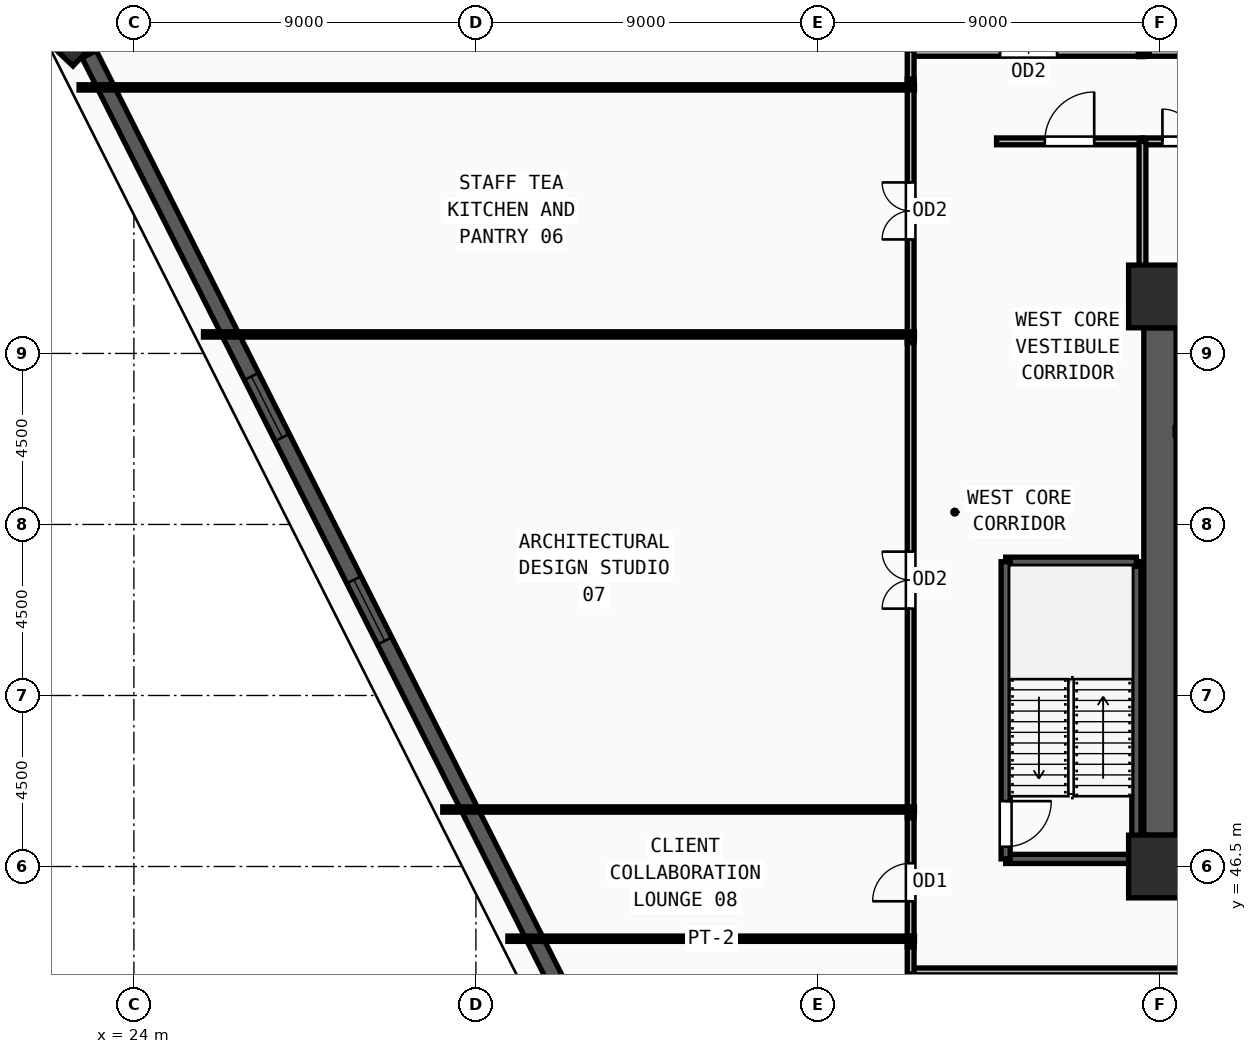
"""IFC4 building model, lengths in metres.
Left out: names, types, materials, properties, quantities, classifications, styles, units other than length and angle.
Written with IfcOpenShell. Run it as: python <this file> out.ifc"""

import sys

from ifc_helpers import new_model, si_unit, direction, frame, frame_2d, origin, origin_2d, place, context, subcontext, project, spatial, rectangle, extrude, source, transform, mapped, element, fill, save


model = new_model("IFC4")
c1 = context("Model", 3, precision=1e-05, world=origin(), true_north=direction((0.0, 1.0)))
c2 = subcontext(c1, "Body", "Model", "MODEL_VIEW")
j1 = project(units=[si_unit("LENGTHUNIT", "METRE"), si_unit("PLANEANGLEUNIT", "RADIAN")], contexts=[c1])
p1 = place(None, origin())
s1 = spatial("IfcSite", under=j1, at=p1, CompositionType="ELEMENT")
p2 = place(p1, origin())
s2 = spatial("IfcBuilding", under=s1, at=p2, CompositionType="ELEMENT")
p3 = place(p2, frame((0.0, 0.0, 85.5)))
s3 = spatial("IfcBuildingStorey", under=s2, at=p3, CompositionType="ELEMENT", Elevation=85.5)
m1 = source(origin(), c2, "Body", "SweptSolid", [
    extrude(rectangle(XDim=1.65, YDim=1.65, at=origin_2d()), origin(), (0.0, 0.0, 1.0), 3.75),
])
for number, where, z_axis, x_axis in (
    (1, (51.0, 46.5, 0.0), (0.0, 0.0, 1.0), (1.0, 0.0, 0.0)),
    (2, (51.0, 61.5, 0.0), (0.0, 0.0, 1.0), (1.0, 0.0, 0.0)),
):
    element("IfcColumn", number, at=place(p3, frame(where, z_axis=z_axis, x_axis=x_axis)), inside=s3, PredefinedType="COLUMN", context=c2, shape_type="MappedRepresentation", body=[
        mapped(m1, transform((0.0, 0.0, 0.0), x_axis=(1.0, 0.0, 0.0), y_axis=(0.0, 1.0, 0.0), z_axis=(0.0, 0.0, 1.0), scale=1.0)),
    ])
m2 = source(origin(), c2, "Body", "SweptSolid", [
    extrude(rectangle(XDim=1.55, YDim=1.25, at=origin_2d()), origin(), (0.0, 0.0, 1.0), 3.75),
])
p4 = place(p3, frame((22.479, 68.555, 0.0), z_axis=(0.0, 0.0, 1.0), x_axis=(0.68936671806, 0.724412539946, 0.0)))
e3 = element("IfcColumn", 3, at=p4, inside=s3, PredefinedType="COLUMN", context=c2, shape_type="MappedRepresentation", body=[
    mapped(m2, transform((0.0, 0.0, 0.0), x_axis=(1.0, 0.0, 0.0), y_axis=(0.0, 1.0, 0.0), z_axis=(0.0, 0.0, 1.0), scale=1.0)),
])
p5 = place(p3, frame((22.823, 67.872, 0.0), z_axis=(0.0, 0.0, 1.0), x_axis=(0.449893825909, -0.893082048531, 0.0)))
e4 = element("IfcWall", 4, at=p5, inside=s3, PredefinedType="SOLIDWALL", context=c2, shape_type="SweptSolid", body=[
    extrude(rectangle(XDim=32.768, YDim=0.42, at=frame_2d((16.384, 0.0))), origin(), (0.0, 0.0, 1.0), 3.57),
])
m3 = source(origin(), c2, "Body", "SweptSolid", [
    extrude(rectangle(XDim=1.8, YDim=1.95, at=frame_2d((0.9, 0.975))), frame((0.0, 0.22, 0.0), z_axis=(0.0, -1.0, 0.0), x_axis=(1.0, 0.0, 0.0)), (0.0, 0.0, 1.0), 0.44),
])
p6 = place(p5, frame((9.492, 0.0, 0.55)))
e5 = element("IfcOpeningElement", 5, at=p6, cuts=e4, PredefinedType="OPENING", context=c2, shape_type="MappedRepresentation", body=[
    mapped(m3, transform((0.0, 0.0, 0.0), x_axis=(1.0, 0.0, 0.0), y_axis=(0.0, 1.0, 0.0), z_axis=(0.0, 0.0, 1.0), scale=1.0)),
])
p7 = place(p5, frame((15.484, 0.0, 0.55)))
e6 = element("IfcOpeningElement", 6, at=p7, cuts=e4, PredefinedType="OPENING", context=c2, shape_type="MappedRepresentation", body=[
    mapped(m3, transform((0.0, 0.0, 0.0), x_axis=(1.0, 0.0, 0.0), y_axis=(0.0, 1.0, 0.0), z_axis=(0.0, 0.0, 1.0), scale=1.0)),
])
p8 = place(p3, frame((51.0, 47.325, 0.0), z_axis=(0.0, 0.0, 1.0), x_axis=(0.0, 1.0, 0.0)))
e7 = element("IfcWall", 7, at=p8, inside=s3, PredefinedType="SHEAR", context=c2, shape_type="SweptSolid", body=[
    extrude(rectangle(XDim=13.35, YDim=0.85, at=frame_2d((6.675, 0.0))), origin(), (0.0, 0.0, 1.0), 3.57),
])
p9 = place(p3, frame((46.94, 46.7, 0.0), z_axis=(0.0, 0.0, 1.0), x_axis=(1.0, 0.0, 0.0)))
e8 = element("IfcWall", 8, at=p9, inside=s3, PredefinedType="SOLIDWALL", context=c2, shape_type="SweptSolid", body=[
    extrude(rectangle(XDim=3.44, YDim=0.24, at=frame_2d((1.72, 0.0))), origin(), (0.0, 0.0, 1.0), 3.57),
])
p10 = place(p3, frame((50.38, 46.7, 0.0), z_axis=(0.0, 0.0, 1.0), x_axis=(0.0, 1.0, 0.0)))
e9 = element("IfcWall", 9, at=p10, inside=s3, PredefinedType="SOLIDWALL", context=c2, shape_type="SweptSolid", body=[
    extrude(rectangle(XDim=7.82, YDim=0.24, at=frame_2d((3.91, 0.0))), origin(), (0.0, 0.0, 1.0), 3.57),
])
p11 = place(p3, frame((50.38, 54.52, 0.0), z_axis=(0.0, 0.0, 1.0), x_axis=(-1.0, 0.0, 0.0)))
e10 = element("IfcWall", 10, at=p11, inside=s3, PredefinedType="SOLIDWALL", context=c2, shape_type="SweptSolid", body=[
    extrude(rectangle(XDim=3.44, YDim=0.24, at=frame_2d((1.72, 0.0))), origin(), (0.0, 0.0, 1.0), 3.57),
])
p12 = place(p3, frame((46.94, 54.52, 0.0), z_axis=(0.0, 0.0, 1.0), x_axis=(0.0, -1.0, 0.0)))
e11 = element("IfcWall", 11, at=p12, inside=s3, PredefinedType="SOLIDWALL", context=c2, shape_type="SweptSolid", body=[
    extrude(rectangle(XDim=7.82, YDim=0.24, at=frame_2d((3.91, 0.0))), origin(), (0.0, 0.0, 1.0), 3.57),
])
m4 = source(origin(), c2, "Body", "SweptSolid", [
    extrude(rectangle(XDim=1.2, YDim=2.2, at=frame_2d((0.6, 1.1))), frame((0.0, 0.13, 0.0), z_axis=(0.0, -1.0, 0.0), x_axis=(1.0, 0.0, 0.0)), (0.0, 0.0, 1.0), 0.26),
])
p13 = place(p12, frame((6.3, 0.0, 0.0)))
e12 = element("IfcOpeningElement", 12, at=p13, cuts=e11, PredefinedType="OPENING", context=c2, shape_type="MappedRepresentation", body=[
    mapped(m4, transform((0.0, 0.0, 0.0), x_axis=(1.0, 0.0, 0.0), y_axis=(0.0, 1.0, 0.0), z_axis=(0.0, 0.0, 1.0), scale=1.0)),
])
for number, where, z_axis, x_axis in (
    (13, (51.4, 57.95, 0.0), (0.0, 0.0, 1.0), (1.0, 0.0, 0.0)),
    (14, (53.8, 60.88, 0.0), (0.0, 0.0, 1.0), (-1.0, 0.0, 0.0)),
):
    element("IfcWall", number, at=place(p3, frame(where, z_axis=z_axis, x_axis=x_axis)), inside=s3, PredefinedType="SOLIDWALL", context=c2, shape_type="SweptSolid", body=[
        extrude(rectangle(XDim=2.4, YDim=0.2, at=frame_2d((1.2, 0.0))), origin(), (0.0, 0.0, 1.0), 3.57),
    ])
p14 = place(p3, frame((50.54, 65.58, 0.0), z_axis=(0.0, 0.0, 1.0), x_axis=(1.0, 0.0, 0.0)))
e15 = element("IfcWall", 15, at=p14, inside=s3, PredefinedType="PARTITIONING", context=c2, shape_type="SweptSolid", body=[
    extrude(rectangle(XDim=1.9, YDim=0.18, at=frame_2d((0.95, 0.0))), origin(), (0.0, 0.0, 1.0), 3.57),
])
m5 = source(origin(), c2, "Body", "SweptSolid", [
    extrude(rectangle(XDim=0.85, YDim=2.1, at=frame_2d((0.425, 1.05))), frame((0.0, 0.1, 0.0), z_axis=(0.0, -1.0, 0.0), x_axis=(1.0, 0.0, 0.0)), (0.0, 0.0, 1.0), 0.2),
])
p15 = place(p14, frame((0.525, 0.0, 0.0)))
e16 = element("IfcOpeningElement", 16, at=p15, cuts=e15, PredefinedType="OPENING", context=c2, shape_type="MappedRepresentation", body=[
    mapped(m5, transform((0.0, 0.0, 0.0), x_axis=(1.0, 0.0, 0.0), y_axis=(0.0, 1.0, 0.0), z_axis=(0.0, 0.0, 1.0), scale=1.0)),
])
p16 = place(p3, frame((46.7, 65.58, 0.0), z_axis=(0.0, 0.0, 1.0), x_axis=(1.0, 0.0, 0.0)))
e17 = element("IfcWall", 17, at=p16, inside=s3, PredefinedType="PARTITIONING", context=c2, shape_type="SweptSolid", body=[
    extrude(rectangle(XDim=3.84, YDim=0.18, at=frame_2d((1.92, 0.0))), origin(), (0.0, 0.0, 1.0), 3.57),
])
m6 = source(origin(), c2, "Body", "SweptSolid", [
    extrude(rectangle(XDim=1.3, YDim=2.2, at=frame_2d((0.65, 1.1))), frame((0.0, 0.1, 0.0), z_axis=(0.0, -1.0, 0.0), x_axis=(1.0, 0.0, 0.0)), (0.0, 0.0, 1.0), 0.2),
])
p17 = place(p16, frame((1.27, 0.0, 0.0)))
e18 = element("IfcOpeningElement", 18, at=p17, cuts=e17, PredefinedType="OPENING", context=c2, shape_type="MappedRepresentation", body=[
    mapped(m6, transform((0.0, 0.0, 0.0), x_axis=(1.0, 0.0, 0.0), y_axis=(0.0, 1.0, 0.0), z_axis=(0.0, 0.0, 1.0), scale=1.0)),
])
p18 = place(p3, frame((44.37, 67.91, 0.0), z_axis=(0.0, 0.0, 1.0), x_axis=(1.0, 0.0, 0.0)))
e19 = element("IfcWall", 19, at=p18, inside=s3, PredefinedType="PARTITIONING", context=c2, shape_type="SweptSolid", body=[
    extrude(rectangle(XDim=6.345, YDim=0.18, at=frame_2d((3.172, 0.0))), origin(), (0.0, 0.0, 1.0), 3.57),
])
m7 = source(origin(), c2, "Body", "SweptSolid", [
    extrude(rectangle(XDim=1.5, YDim=2.2, at=frame_2d((0.75, 1.1))), frame((0.0, 0.1, 0.0), z_axis=(0.0, -1.0, 0.0), x_axis=(1.0, 0.0, 0.0)), (0.0, 0.0, 1.0), 0.2),
])
p19 = place(p18, frame((2.423, 0.0, 0.0)))
e20 = element("IfcOpeningElement", 20, at=p19, cuts=e19, PredefinedType="OPENING", context=c2, shape_type="MappedRepresentation", body=[
    mapped(m7, transform((0.0, 0.0, 0.0), x_axis=(1.0, 0.0, 0.0), y_axis=(0.0, 1.0, 0.0), z_axis=(0.0, 0.0, 1.0), scale=1.0)),
])
p20 = place(p3, frame((44.44, 60.285, 0.0), z_axis=(0.0, 0.0, 1.0), x_axis=(0.0, 1.0, 0.0)))
e21 = element("IfcWall", 21, at=p20, inside=s3, PredefinedType="PARTITIONING", context=c2, shape_type="SweptSolid", body=[
    extrude(rectangle(XDim=6.93, YDim=0.18, at=frame_2d((3.465, 0.0))), origin(), (0.0, 0.0, 1.0), 3.57),
])
p21 = place(p20, frame((2.715, 0.0, 0.0)))
e22 = element("IfcOpeningElement", 22, at=p21, cuts=e21, PredefinedType="OPENING", context=c2, shape_type="MappedRepresentation", body=[
    mapped(m7, transform((0.0, 0.0, 0.0), x_axis=(1.0, 0.0, 0.0), y_axis=(0.0, 1.0, 0.0), z_axis=(0.0, 0.0, 1.0), scale=1.0)),
])
p22 = place(p3, frame((44.44, 47.785, 0.0), z_axis=(0.0, 0.0, 1.0), x_axis=(0.0, 1.0, 0.0)))
e23 = element("IfcWall", 23, at=p22, inside=s3, PredefinedType="PARTITIONING", context=c2, shape_type="SweptSolid", body=[
    extrude(rectangle(XDim=12.5, YDim=0.18, at=frame_2d((6.25, 0.0))), origin(), (0.0, 0.0, 1.0), 3.57),
])
p23 = place(p22, frame((5.5, 0.0, 0.0)))
e24 = element("IfcOpeningElement", 24, at=p23, cuts=e23, PredefinedType="OPENING", context=c2, shape_type="MappedRepresentation", body=[
    mapped(m7, transform((0.0, 0.0, 0.0), x_axis=(1.0, 0.0, 0.0), y_axis=(0.0, 1.0, 0.0), z_axis=(0.0, 0.0, 1.0), scale=1.0)),
])
p24 = place(p3, frame((44.44, 44.385, 0.0), z_axis=(0.0, 0.0, 1.0), x_axis=(0.0, 1.0, 0.0)))
e25 = element("IfcWall", 25, at=p24, inside=s3, PredefinedType="PARTITIONING", context=c2, shape_type="SweptSolid", body=[
    extrude(rectangle(XDim=3.4, YDim=0.18, at=frame_2d((1.7, 0.0))), origin(), (0.0, 0.0, 1.0), 3.57),
])
m8 = source(origin(), c2, "Body", "SweptSolid", [
    extrude(rectangle(XDim=1.0, YDim=2.2, at=frame_2d((0.5, 1.1))), frame((0.0, 0.1, 0.0), z_axis=(0.0, -1.0, 0.0), x_axis=(1.0, 0.0, 0.0)), (0.0, 0.0, 1.0), 0.2),
])
p25 = place(p24, frame((1.2, 0.0, 0.0)))
e26 = element("IfcOpeningElement", 26, at=p25, cuts=e25, PredefinedType="OPENING", context=c2, shape_type="MappedRepresentation", body=[
    mapped(m8, transform((0.0, 0.0, 0.0), x_axis=(1.0, 0.0, 0.0), y_axis=(0.0, 1.0, 0.0), z_axis=(0.0, 0.0, 1.0), scale=1.0)),
])
p26 = place(p3, frame((75.63, 43.74, 0.0), z_axis=(0.0, 0.0, 1.0), x_axis=(-1.0, 0.0, 0.0)))
e27 = element("IfcWall", 27, at=p26, inside=s3, PredefinedType="PARTITIONING", context=c2, shape_type="SweptSolid", body=[
    extrude(rectangle(XDim=31.26, YDim=0.18, at=frame_2d((15.63, 0.0))), origin(), (0.0, 0.0, 1.0), 3.57),
])
p27 = place(p26, frame((9.78, 0.0, 0.0)))
e28 = element("IfcOpeningElement", 28, at=p27, cuts=e27, PredefinedType="OPENING", context=c2, shape_type="MappedRepresentation", body=[
    mapped(m7, transform((0.0, 0.0, 0.0), x_axis=(1.0, 0.0, 0.0), y_axis=(0.0, 1.0, 0.0), z_axis=(0.0, 0.0, 1.0), scale=1.0)),
])
p28 = place(p3, frame((50.54, 61.95, 0.0), z_axis=(0.0, 0.0, 1.0), x_axis=(0.0, 1.0, 0.0)))
e29 = element("IfcWall", 29, at=p28, inside=s3, PredefinedType="PARTITIONING", context=c2, shape_type="SweptSolid", body=[
    extrude(rectangle(XDim=3.63, YDim=0.18, at=frame_2d((1.815, 0.0))), origin(), (0.0, 0.0, 1.0), 3.57),
])
p29 = place(p3, frame((50.715, 67.91, 0.0), z_axis=(0.0, 0.0, 1.0), x_axis=(1.0, 0.0, 0.0)))
e30 = element("IfcWall", 30, at=p29, inside=s3, PredefinedType="PARTITIONING", context=c2, shape_type="SweptSolid", body=[
    extrude(rectangle(XDim=8.195, YDim=0.18, at=frame_2d((4.097, 0.0))), origin(), (0.0, 0.0, 1.0), 3.57),
])
p30 = place(p3, frame((44.44, 67.215, 0.0), z_axis=(0.0, 0.0, 1.0), x_axis=(0.0, 1.0, 0.0)))
e31 = element("IfcWall", 31, at=p30, inside=s3, PredefinedType="PARTITIONING", context=c2, shape_type="SweptSolid", body=[
    extrude(rectangle(XDim=0.765, YDim=0.18, at=frame_2d((0.382, 0.0))), origin(), (0.0, 0.0, 1.0), 3.57),
])
p31 = place(p3, frame((44.44, 43.67, 0.0), z_axis=(0.0, 0.0, 1.0), x_axis=(0.0, 1.0, 0.0)))
e32 = element("IfcWall", 32, at=p31, inside=s3, PredefinedType="PARTITIONING", context=c2, shape_type="SweptSolid", body=[
    extrude(rectangle(XDim=0.715, YDim=0.18, at=frame_2d((0.357, 0.0))), origin(), (0.0, 0.0, 1.0), 3.57),
])
p32 = place(p3, frame((44.54, 44.6, 0.0), z_axis=(0.0, 0.0, 1.0), x_axis=(-1.0, 0.0, 0.0)))
e33 = element("IfcWall", 33, at=p32, inside=s3, PredefinedType="PARTITIONING", context=c2, shape_type="SweptSolid", body=[
    extrude(rectangle(XDim=10.699, YDim=0.14, at=frame_2d((5.35, 0.0))), origin(), (0.0, 0.0, 1.0), 3.57),
])
p33 = place(p3, frame((44.54, 48.0, 0.0), z_axis=(0.0, 0.0, 1.0), x_axis=(-1.0, 0.0, 0.0)))
e34 = element("IfcWall", 34, at=p33, inside=s3, PredefinedType="PARTITIONING", context=c2, shape_type="SweptSolid", body=[
    extrude(rectangle(XDim=12.412, YDim=0.14, at=frame_2d((6.206, 0.0))), origin(), (0.0, 0.0, 1.0), 3.57),
])
p34 = place(p3, frame((44.54, 60.5, 0.0), z_axis=(0.0, 0.0, 1.0), x_axis=(-1.0, 0.0, 0.0)))
e35 = element("IfcWall", 35, at=p34, inside=s3, PredefinedType="PARTITIONING", context=c2, shape_type="SweptSolid", body=[
    extrude(rectangle(XDim=18.708, YDim=0.14, at=frame_2d((9.354, 0.0))), origin(), (0.0, 0.0, 1.0), 3.57),
])
p35 = place(p3, frame((44.54, 67.0, 0.0), z_axis=(0.0, 0.0, 1.0), x_axis=(-1.0, 0.0, 0.0)))
e36 = element("IfcWall", 36, at=p35, inside=s3, PredefinedType="PARTITIONING", context=c2, shape_type="SweptSolid", body=[
    extrude(rectangle(XDim=21.983, YDim=0.14, at=frame_2d((10.992, 0.0))), origin(), (0.0, 0.0, 1.0), 2.655),
])
p36 = place(p3, frame((50.5, 67.81, 0.0), z_axis=(0.0, 0.0, 1.0), x_axis=(0.0, 1.0, 0.0)))
e37 = element("IfcWall", 37, at=p36, inside=s3, PredefinedType="PARTITIONING", context=c2, shape_type="SweptSolid", body=[
    extrude(rectangle(XDim=13.537, YDim=0.14, at=frame_2d((6.769, 0.0))), origin(), (0.0, 0.0, 1.0), 3.57),
])
m9 = source(origin(), c2, "Body", "SweptSolid", [
    extrude(rectangle(XDim=1.8, YDim=1.95, at=frame_2d((0.9, 0.975))), frame((0.0, 0.03, 0.0), z_axis=(0.0, -1.0, 0.0), x_axis=(1.0, 0.0, 0.0)), (0.0, 0.0, 1.0), 0.06),
])
p37 = place(p6, origin())
e38 = element("IfcWindow", 38, at=p37, inside=s3, PartitioningType="DOUBLE_PANEL_VERTICAL", PredefinedType="WINDOW", context=c2, shape_type="MappedRepresentation", body=[
    mapped(m9, transform((0.0, 0.0, 0.0), x_axis=(1.0, 0.0, 0.0), y_axis=(0.0, 1.0, 0.0), z_axis=(0.0, 0.0, 1.0), scale=1.0)),
])
fill(e5, e38)
p38 = place(p7, origin())
e39 = element("IfcWindow", 39, at=p38, inside=s3, PartitioningType="DOUBLE_PANEL_VERTICAL", PredefinedType="WINDOW", context=c2, shape_type="MappedRepresentation", body=[
    mapped(m9, transform((0.0, 0.0, 0.0), x_axis=(1.0, 0.0, 0.0), y_axis=(0.0, 1.0, 0.0), z_axis=(0.0, 0.0, 1.0), scale=1.0)),
])
fill(e6, e39)
m10 = source(origin(), c2, "Body", "SweptSolid", [
    extrude(rectangle(XDim=1.2, YDim=2.2, at=frame_2d((0.6, 1.1))), frame((0.0, 0.025, 0.0), z_axis=(0.0, -1.0, 0.0), x_axis=(1.0, 0.0, 0.0)), (0.0, 0.0, 1.0), 0.05),
])
p39 = place(p13, origin())
e40 = element("IfcDoor", 40, at=p39, inside=s3, OperationType="SINGLE_SWING_LEFT", PredefinedType="DOOR", context=c2, shape_type="MappedRepresentation", body=[
    mapped(m10, transform((0.0, 0.0, 0.0), x_axis=(1.0, 0.0, 0.0), y_axis=(0.0, 1.0, 0.0), z_axis=(0.0, 0.0, 1.0), scale=1.0)),
])
fill(e12, e40)
m11 = source(origin(), c2, "Body", "SweptSolid", [
    extrude(rectangle(XDim=0.85, YDim=2.1, at=frame_2d((0.425, 1.05))), frame((0.0, 0.025, 0.0), z_axis=(0.0, -1.0, 0.0), x_axis=(1.0, 0.0, 0.0)), (0.0, 0.0, 1.0), 0.05),
])
p40 = place(p15, origin())
e41 = element("IfcDoor", 41, at=p40, inside=s3, OperationType="SINGLE_SWING_LEFT", PredefinedType="DOOR", context=c2, shape_type="MappedRepresentation", body=[
    mapped(m11, transform((0.0, 0.0, 0.0), x_axis=(1.0, 0.0, 0.0), y_axis=(0.0, 1.0, 0.0), z_axis=(0.0, 0.0, 1.0), scale=1.0)),
])
fill(e16, e41)
m12 = source(origin(), c2, "Body", "SweptSolid", [
    extrude(rectangle(XDim=1.3, YDim=2.2, at=frame_2d((0.65, 1.1))), frame((0.0, 0.025, 0.0), z_axis=(0.0, -1.0, 0.0), x_axis=(1.0, 0.0, 0.0)), (0.0, 0.0, 1.0), 0.05),
])
p41 = place(p17, origin())
e42 = element("IfcDoor", 42, at=p41, inside=s3, OperationType="SINGLE_SWING_RIGHT", PredefinedType="DOOR", context=c2, shape_type="MappedRepresentation", body=[
    mapped(m12, transform((0.0, 0.0, 0.0), x_axis=(1.0, 0.0, 0.0), y_axis=(0.0, 1.0, 0.0), z_axis=(0.0, 0.0, 1.0), scale=1.0)),
])
fill(e18, e42)
m13 = source(origin(), c2, "Body", "SweptSolid", [
    extrude(rectangle(XDim=1.5, YDim=2.2, at=frame_2d((0.75, 1.1))), frame((0.0, 0.025, 0.0), z_axis=(0.0, -1.0, 0.0), x_axis=(1.0, 0.0, 0.0)), (0.0, 0.0, 1.0), 0.05),
])
p42 = place(p19, origin())
e43 = element("IfcDoor", 43, at=p42, inside=s3, OperationType="DOUBLE_DOOR_SINGLE_SWING", PredefinedType="DOOR", context=c2, shape_type="MappedRepresentation", body=[
    mapped(m13, transform((0.0, 0.0, 0.0), x_axis=(1.0, 0.0, 0.0), y_axis=(0.0, 1.0, 0.0), z_axis=(0.0, 0.0, 1.0), scale=1.0)),
])
fill(e20, e43)
p43 = place(p21, origin())
e44 = element("IfcDoor", 44, at=p43, inside=s3, OperationType="DOUBLE_DOOR_SINGLE_SWING", PredefinedType="DOOR", context=c2, shape_type="MappedRepresentation", body=[
    mapped(m13, transform((0.0, 0.0, 0.0), x_axis=(1.0, 0.0, 0.0), y_axis=(0.0, 1.0, 0.0), z_axis=(0.0, 0.0, 1.0), scale=1.0)),
])
fill(e22, e44)
p44 = place(p23, origin())
e45 = element("IfcDoor", 45, at=p44, inside=s3, OperationType="DOUBLE_DOOR_SINGLE_SWING", PredefinedType="DOOR", context=c2, shape_type="MappedRepresentation", body=[
    mapped(m13, transform((0.0, 0.0, 0.0), x_axis=(1.0, 0.0, 0.0), y_axis=(0.0, 1.0, 0.0), z_axis=(0.0, 0.0, 1.0), scale=1.0)),
])
fill(e24, e45)
m14 = source(origin(), c2, "Body", "SweptSolid", [
    extrude(rectangle(XDim=1.0, YDim=2.2, at=frame_2d((0.5, 1.1))), frame((0.0, 0.025, 0.0), z_axis=(0.0, -1.0, 0.0), x_axis=(1.0, 0.0, 0.0)), (0.0, 0.0, 1.0), 0.05),
])
p45 = place(p25, origin())
e46 = element("IfcDoor", 46, at=p45, inside=s3, OperationType="SINGLE_SWING_LEFT", PredefinedType="DOOR", context=c2, shape_type="MappedRepresentation", body=[
    mapped(m14, transform((0.0, 0.0, 0.0), x_axis=(1.0, 0.0, 0.0), y_axis=(0.0, 1.0, 0.0), z_axis=(0.0, 0.0, 1.0), scale=1.0)),
])
fill(e26, e46)
save(model, sys.argv[1])
